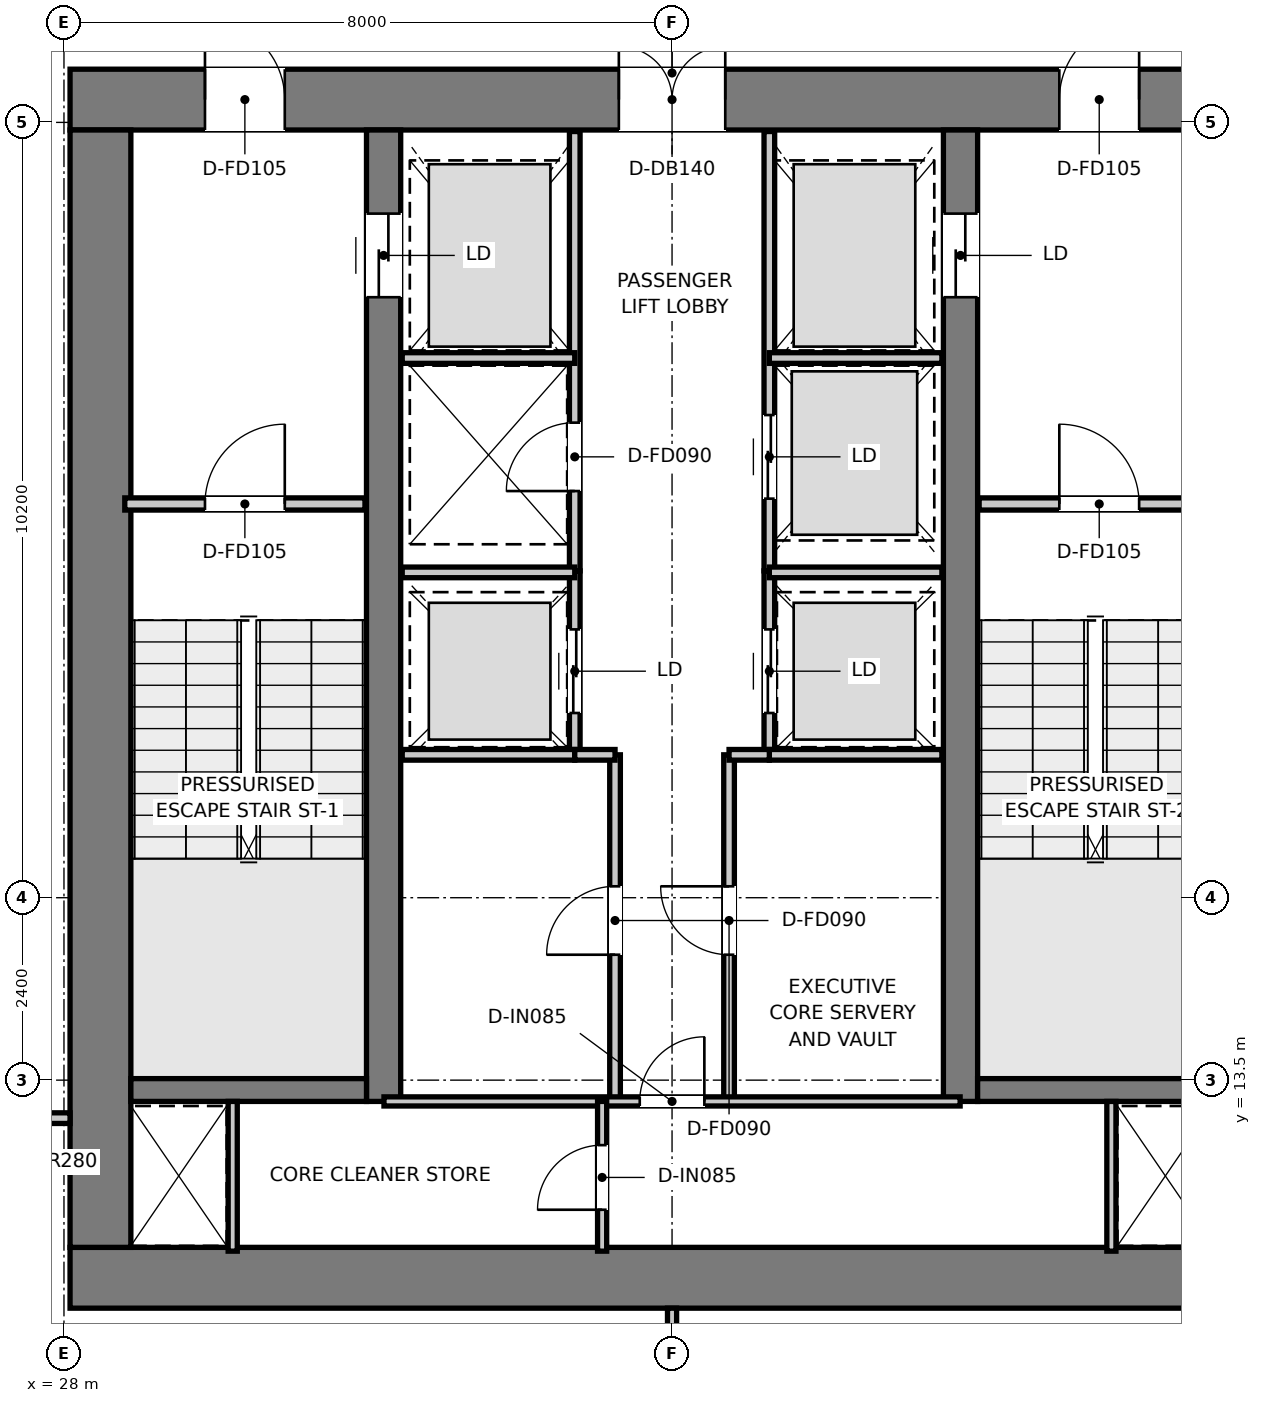
"""IFC4 building model, lengths in metres.
Left out: names, types, materials, properties, quantities, classifications, styles, units other than length and angle.
Written with IfcOpenShell. Run it as: python <this file> out.ifc"""

import sys

from ifc_helpers import new_model, si_unit, direction, frame, frame_2d, origin, place, context, subcontext, project, spatial, rectangle, extrude, element, fill, save


model = new_model("IFC4")
c1 = context("Model", 3, precision=1e-05, world=origin(), true_north=direction((0.0, 1.0)))
c2 = subcontext(c1, "Body", "Model", "MODEL_VIEW")
j1 = project(units=[si_unit("LENGTHUNIT", "METRE"), si_unit("PLANEANGLEUNIT", "RADIAN")], contexts=[c1])
p1 = place(None, origin())
s1 = spatial("IfcSite", under=j1, at=p1, CompositionType="ELEMENT")
p2 = place(p1, origin())
s2 = spatial("IfcBuilding", under=s1, at=p2, CompositionType="ELEMENT")
p3 = place(p2, frame((0.0, 0.0, 359.3)))
s3 = spatial("IfcBuildingStorey", under=s2, at=p3, CompositionType="ELEMENT", Elevation=359.3)
p4 = place(p3, frame((28.08, 10.9, 0.0), z_axis=(0.0, 0.0, 1.0), x_axis=(1.0, 0.0, 0.0)))
e1 = element("IfcWall", 1, at=p4, inside=s3, PredefinedType="SHEAR", context=c2, shape_type="SweptSolid", body=[
    extrude(rectangle(XDim=15.84, YDim=0.8, at=frame_2d((7.92, 0.0))), origin(), (0.0, 0.0, 1.0), 3.95),
])
p5 = place(p3, frame((28.08, 26.4, 0.0), z_axis=(0.0, 0.0, 1.0), x_axis=(1.0, 0.0, 0.0)))
e2 = element("IfcWall", 2, at=p5, inside=s3, PredefinedType="SHEAR", context=c2, shape_type="SweptSolid", body=[
    extrude(rectangle(XDim=15.84, YDim=0.8, at=frame_2d((7.92, 0.0))), origin(), (0.0, 0.0, 1.0), 3.95),
])
p6 = place(p5, frame((7.22, 0.0, 0.0)))
e3 = element("IfcOpeningElement", 3, at=p6, cuts=e2, PredefinedType="OPENING", context=c2, shape_type="SweptSolid", body=[
    extrude(rectangle(XDim=1.4, YDim=2.2, at=frame_2d((0.7, 1.1))), frame((0.0, 0.41, 0.0), z_axis=(0.0, -1.0, 0.0), x_axis=(1.0, 0.0, 0.0)), (0.0, 0.0, 1.0), 0.82),
])
p7 = place(p5, frame((1.775, 0.0, 0.0)))
e4 = element("IfcOpeningElement", 4, at=p7, cuts=e2, PredefinedType="OPENING", context=c2, shape_type="SweptSolid", body=[
    extrude(rectangle(XDim=1.05, YDim=2.1, at=frame_2d((0.525, 1.05))), frame((0.0, 0.41, 0.0), z_axis=(0.0, -1.0, 0.0), x_axis=(1.0, 0.0, 0.0)), (0.0, 0.0, 1.0), 0.82),
])
p8 = place(p5, frame((13.015, 0.0, 0.0)))
e5 = element("IfcOpeningElement", 5, at=p8, cuts=e2, PredefinedType="OPENING", context=c2, shape_type="SweptSolid", body=[
    extrude(rectangle(XDim=1.05, YDim=2.1, at=frame_2d((0.525, 1.05))), frame((0.0, 0.41, 0.0), z_axis=(0.0, -1.0, 0.0), x_axis=(1.0, 0.0, 0.0)), (0.0, 0.0, 1.0), 0.82),
])
p9 = place(p3, frame((28.48, 11.3, 0.0), z_axis=(0.0, 0.0, 1.0), x_axis=(0.0, 1.0, 0.0)))
e6 = element("IfcWall", 6, at=p9, inside=s3, PredefinedType="SHEAR", context=c2, shape_type="SweptSolid", body=[
    extrude(rectangle(XDim=14.7, YDim=0.8, at=frame_2d((7.35, 0.0))), origin(), (0.0, 0.0, 1.0), 3.95),
])
p10 = place(p3, frame((32.205, 13.22, 0.0), z_axis=(0.0, 0.0, 1.0), x_axis=(0.0, 1.0, 0.0)))
e7 = element("IfcWall", 7, at=p10, inside=s3, PredefinedType="SHEAR", context=c2, shape_type="SweptSolid", body=[
    extrude(rectangle(XDim=12.78, YDim=0.45, at=frame_2d((6.39, 0.0))), origin(), (0.0, 0.0, 1.0), 3.95),
])
p11 = place(p10, frame((10.58, 0.0, 0.0)))
e8 = element("IfcOpeningElement", 8, at=p11, cuts=e7, PredefinedType="OPENING", context=c2, shape_type="SweptSolid", body=[
    extrude(rectangle(XDim=1.1, YDim=2.15, at=frame_2d((0.55, 1.075))), frame((0.0, 0.235, 0.0), z_axis=(0.0, -1.0, 0.0), x_axis=(1.0, 0.0, 0.0)), (0.0, 0.0, 1.0), 0.47),
])
p12 = place(p3, frame((39.795, 13.22, 0.0), z_axis=(0.0, 0.0, 1.0), x_axis=(0.0, 1.0, 0.0)))
e9 = element("IfcWall", 9, at=p12, inside=s3, PredefinedType="SHEAR", context=c2, shape_type="SweptSolid", body=[
    extrude(rectangle(XDim=12.78, YDim=0.45, at=frame_2d((6.39, 0.0))), origin(), (0.0, 0.0, 1.0), 3.95),
])
p13 = place(p12, frame((10.58, 0.0, 0.0)))
e10 = element("IfcOpeningElement", 10, at=p13, cuts=e9, PredefinedType="OPENING", context=c2, shape_type="SweptSolid", body=[
    extrude(rectangle(XDim=1.1, YDim=2.15, at=frame_2d((0.55, 1.075))), frame((0.0, 0.235, 0.0), z_axis=(0.0, -1.0, 0.0), x_axis=(1.0, 0.0, 0.0)), (0.0, 0.0, 1.0), 0.47),
])
for number, where, z_axis, x_axis in (
    (11, (28.88, 13.37, 0.0), (0.0, 0.0, 1.0), (1.0, 0.0, 0.0)),
    (12, (40.02, 13.37, 0.0), (0.0, 0.0, 1.0), (1.0, 0.0, 0.0)),
):
    element("IfcWall", number, at=place(p3, frame(where, z_axis=z_axis, x_axis=x_axis)), inside=s3, PredefinedType="SHEAR", context=c2, shape_type="SweptSolid", body=[
        extrude(rectangle(XDim=3.1, YDim=0.3, at=frame_2d((1.55, 0.0))), origin(), (0.0, 0.0, 1.0), 3.95),
    ])
p14 = place(p3, frame((28.8, 21.08, 0.0), z_axis=(0.0, 0.0, 1.0), x_axis=(1.0, 0.0, 0.0)))
e13 = element("IfcWall", 13, at=p14, inside=s3, PredefinedType="PARTITIONING", context=c2, shape_type="SweptSolid", body=[
    extrude(rectangle(XDim=3.16, YDim=0.16, at=frame_2d((1.58, 0.0))), origin(), (0.0, 0.0, 1.0), 3.6),
])
p15 = place(p14, frame((1.055, 0.0, 0.0)))
e14 = element("IfcOpeningElement", 14, at=p15, cuts=e13, PredefinedType="OPENING", context=c2, shape_type="SweptSolid", body=[
    extrude(rectangle(XDim=1.05, YDim=2.1, at=frame_2d((0.525, 1.05))), frame((0.0, 0.09, 0.0), z_axis=(0.0, -1.0, 0.0), x_axis=(1.0, 0.0, 0.0)), (0.0, 0.0, 1.0), 0.18),
])
p16 = place(p3, frame((40.04, 21.08, 0.0), z_axis=(0.0, 0.0, 1.0), x_axis=(1.0, 0.0, 0.0)))
e15 = element("IfcWall", 15, at=p16, inside=s3, PredefinedType="PARTITIONING", context=c2, shape_type="SweptSolid", body=[
    extrude(rectangle(XDim=3.16, YDim=0.16, at=frame_2d((1.58, 0.0))), origin(), (0.0, 0.0, 1.0), 3.6),
])
p17 = place(p16, frame((1.055, 0.0, 0.0)))
e16 = element("IfcOpeningElement", 16, at=p17, cuts=e15, PredefinedType="OPENING", context=c2, shape_type="SweptSolid", body=[
    extrude(rectangle(XDim=1.05, YDim=2.1, at=frame_2d((0.525, 1.05))), frame((0.0, 0.09, 0.0), z_axis=(0.0, -1.0, 0.0), x_axis=(1.0, 0.0, 0.0)), (0.0, 0.0, 1.0), 0.18),
])
p18 = place(p3, frame((34.72, 20.2, 0.0), z_axis=(0.0, 0.0, 1.0), x_axis=(0.0, 1.0, 0.0)))
e17 = element("IfcWall", 17, at=p18, inside=s3, PredefinedType="PARTITIONING", context=c2, shape_type="SweptSolid", body=[
    extrude(rectangle(XDim=5.78, YDim=0.14, at=frame_2d((2.89, 0.0))), origin(), (0.0, 0.0, 1.0), 2.75),
])
p19 = place(p18, frame((1.05, 0.0, 0.0)))
e18 = element("IfcOpeningElement", 18, at=p19, cuts=e17, PredefinedType="OPENING", context=c2, shape_type="SweptSolid", body=[
    extrude(rectangle(XDim=0.9, YDim=2.1, at=frame_2d((0.45, 1.05))), frame((0.0, 0.08, 0.0), z_axis=(0.0, -1.0, 0.0), x_axis=(1.0, 0.0, 0.0)), (0.0, 0.0, 1.0), 0.16),
])
p20 = place(p3, frame((37.28, 20.2, 0.0), z_axis=(0.0, 0.0, 1.0), x_axis=(0.0, 1.0, 0.0)))
e19 = element("IfcWall", 19, at=p20, inside=s3, PredefinedType="PARTITIONING", context=c2, shape_type="SweptSolid", body=[
    extrude(rectangle(XDim=5.78, YDim=0.14, at=frame_2d((2.89, 0.0))), origin(), (0.0, 0.0, 1.0), 2.75),
])
p21 = place(p20, frame((0.95, 0.0, 0.0)))
e20 = element("IfcOpeningElement", 20, at=p21, cuts=e19, PredefinedType="OPENING", context=c2, shape_type="SweptSolid", body=[
    extrude(rectangle(XDim=1.1, YDim=2.15, at=frame_2d((0.55, 1.075))), frame((0.0, 0.08, 0.0), z_axis=(0.0, -1.0, 0.0), x_axis=(1.0, 0.0, 0.0)), (0.0, 0.0, 1.0), 0.16),
])
for number, where, z_axis, x_axis in (
    (21, (32.45, 23.0, 0.0), (0.0, 0.0, 1.0), (1.0, 0.0, 0.0)),
    (22, (37.28, 23.0, 0.0), (0.0, 0.0, 1.0), (1.0, 0.0, 0.0)),
):
    element("IfcWall", number, at=place(p3, frame(where, z_axis=z_axis, x_axis=x_axis)), inside=s3, PredefinedType="PARTITIONING", context=c2, shape_type="SweptSolid", body=[
        extrude(rectangle(XDim=2.27, YDim=0.14, at=frame_2d((1.135, 0.0))), origin(), (0.0, 0.0, 1.0), 2.75),
    ])
p22 = place(p3, frame((34.72, 17.78, 0.0), z_axis=(0.0, 0.0, 1.0), x_axis=(0.0, 1.0, 0.0)))
e23 = element("IfcWall", 23, at=p22, inside=s3, PredefinedType="PARTITIONING", context=c2, shape_type="SweptSolid", body=[
    extrude(rectangle(XDim=2.42, YDim=0.14, at=frame_2d((1.21, 0.0))), origin(), (0.0, 0.0, 1.0), 3.6),
])
p23 = place(p22, frame((0.55, 0.0, 0.0)))
e24 = element("IfcOpeningElement", 24, at=p23, cuts=e23, PredefinedType="OPENING", context=c2, shape_type="SweptSolid", body=[
    extrude(rectangle(XDim=1.1, YDim=2.15, at=frame_2d((0.55, 1.075))), frame((0.0, 0.08, 0.0), z_axis=(0.0, -1.0, 0.0), x_axis=(1.0, 0.0, 0.0)), (0.0, 0.0, 1.0), 0.16),
])
p24 = place(p3, frame((37.28, 17.78, 0.0), z_axis=(0.0, 0.0, 1.0), x_axis=(0.0, 1.0, 0.0)))
e25 = element("IfcWall", 25, at=p24, inside=s3, PredefinedType="PARTITIONING", context=c2, shape_type="SweptSolid", body=[
    extrude(rectangle(XDim=2.42, YDim=0.14, at=frame_2d((1.21, 0.0))), origin(), (0.0, 0.0, 1.0), 3.6),
])
p25 = place(p24, frame((0.55, 0.0, 0.0)))
e26 = element("IfcOpeningElement", 26, at=p25, cuts=e25, PredefinedType="OPENING", context=c2, shape_type="SweptSolid", body=[
    extrude(rectangle(XDim=1.1, YDim=2.15, at=frame_2d((0.55, 1.075))), frame((0.0, 0.08, 0.0), z_axis=(0.0, -1.0, 0.0), x_axis=(1.0, 0.0, 0.0)), (0.0, 0.0, 1.0), 0.16),
])
for number, where, z_axis, x_axis in (
    (27, (32.45, 17.78, 0.0), (0.0, 0.0, 1.0), (1.0, 0.0, 0.0)),
    (28, (32.45, 20.18, 0.0), (0.0, 0.0, 1.0), (1.0, 0.0, 0.0)),
    (29, (37.28, 17.78, 0.0), (0.0, 0.0, 1.0), (1.0, 0.0, 0.0)),
    (30, (37.28, 20.18, 0.0), (0.0, 0.0, 1.0), (1.0, 0.0, 0.0)),
):
    element("IfcWall", number, at=place(p3, frame(where, z_axis=z_axis, x_axis=x_axis)), inside=s3, PredefinedType="PARTITIONING", context=c2, shape_type="SweptSolid", body=[
        extrude(rectangle(XDim=2.27, YDim=0.14, at=frame_2d((1.135, 0.0))), origin(), (0.0, 0.0, 1.0), 3.6),
    ])
p26 = place(p3, frame((35.25, 13.22, 0.0), z_axis=(0.0, 0.0, 1.0), x_axis=(0.0, 1.0, 0.0)))
e31 = element("IfcWall", 31, at=p26, inside=s3, PredefinedType="PARTITIONING", context=c2, shape_type="SweptSolid", body=[
    extrude(rectangle(XDim=4.56, YDim=0.14, at=frame_2d((2.28, 0.0))), origin(), (0.0, 0.0, 1.0), 3.6),
])
p27 = place(p26, frame((1.93, 0.0, 0.0)))
e32 = element("IfcOpeningElement", 32, at=p27, cuts=e31, PredefinedType="OPENING", context=c2, shape_type="SweptSolid", body=[
    extrude(rectangle(XDim=0.9, YDim=2.1, at=frame_2d((0.45, 1.05))), frame((0.0, 0.08, 0.0), z_axis=(0.0, -1.0, 0.0), x_axis=(1.0, 0.0, 0.0)), (0.0, 0.0, 1.0), 0.16),
])
p28 = place(p3, frame((34.72, 17.78, 0.0), z_axis=(0.0, 0.0, 1.0), x_axis=(1.0, 0.0, 0.0)))
e33 = element("IfcWall", 33, at=p28, inside=s3, PredefinedType="PARTITIONING", context=c2, shape_type="SweptSolid", body=[
    extrude(rectangle(XDim=0.53, YDim=0.14, at=frame_2d((0.265, 0.0))), origin(), (0.0, 0.0, 1.0), 3.6),
])
p29 = place(p3, frame((36.75, 13.22, 0.0), z_axis=(0.0, 0.0, 1.0), x_axis=(0.0, 1.0, 0.0)))
e34 = element("IfcWall", 34, at=p29, inside=s3, PredefinedType="PARTITIONING", context=c2, shape_type="SweptSolid", body=[
    extrude(rectangle(XDim=4.56, YDim=0.14, at=frame_2d((2.28, 0.0))), origin(), (0.0, 0.0, 1.0), 3.6),
])
p30 = place(p29, frame((1.93, 0.0, 0.0)))
e35 = element("IfcOpeningElement", 35, at=p30, cuts=e34, PredefinedType="OPENING", context=c2, shape_type="SweptSolid", body=[
    extrude(rectangle(XDim=0.9, YDim=2.1, at=frame_2d((0.45, 1.05))), frame((0.0, 0.08, 0.0), z_axis=(0.0, -1.0, 0.0), x_axis=(1.0, 0.0, 0.0)), (0.0, 0.0, 1.0), 0.16),
])
p31 = place(p3, frame((36.75, 17.78, 0.0), z_axis=(0.0, 0.0, 1.0), x_axis=(1.0, 0.0, 0.0)))
e36 = element("IfcWall", 36, at=p31, inside=s3, PredefinedType="PARTITIONING", context=c2, shape_type="SweptSolid", body=[
    extrude(rectangle(XDim=0.53, YDim=0.14, at=frame_2d((0.265, 0.0))), origin(), (0.0, 0.0, 1.0), 3.6),
])
for number, where, z_axis, x_axis in (
    (37, (30.22, 11.25, 0.0), (0.0, 0.0, 1.0), (0.0, 1.0, 0.0)),
    (38, (41.78, 11.25, 0.0), (0.0, 0.0, 1.0), (0.0, 1.0, 0.0)),
):
    element("IfcWall", number, at=place(p3, frame(where, z_axis=z_axis, x_axis=x_axis)), inside=s3, PredefinedType="PARTITIONING", context=c2, shape_type="SweptSolid", body=[
        extrude(rectangle(XDim=1.97, YDim=0.12, at=frame_2d((0.985, 0.0))), origin(), (0.0, 0.0, 1.0), 3.6),
    ])
p32 = place(p3, frame((32.21, 13.22, 0.0), z_axis=(0.0, 0.0, 1.0), x_axis=(1.0, 0.0, 0.0)))
e39 = element("IfcWall", 39, at=p32, inside=s3, PredefinedType="PARTITIONING", context=c2, shape_type="SweptSolid", body=[
    extrude(rectangle(XDim=7.58, YDim=0.12, at=frame_2d((3.79, 0.0))), origin(), (0.0, 0.0, 1.0), 3.6),
])
p33 = place(p32, frame((3.365, 0.0, 0.0)))
e40 = element("IfcOpeningElement", 40, at=p33, cuts=e39, PredefinedType="OPENING", context=c2, shape_type="SweptSolid", body=[
    extrude(rectangle(XDim=0.85, YDim=2.1, at=frame_2d((0.425, 1.05))), frame((0.0, 0.07, 0.0), z_axis=(0.0, -1.0, 0.0), x_axis=(1.0, 0.0, 0.0)), (0.0, 0.0, 1.0), 0.14),
])
p34 = place(p3, frame((35.08, 11.25, 0.0), z_axis=(0.0, 0.0, 1.0), x_axis=(0.0, 1.0, 0.0)))
e41 = element("IfcWall", 41, at=p34, inside=s3, PredefinedType="PARTITIONING", context=c2, shape_type="SweptSolid", body=[
    extrude(rectangle(XDim=1.97, YDim=0.12, at=frame_2d((0.985, 0.0))), origin(), (0.0, 0.0, 1.0), 3.6),
])
p35 = place(p34, frame((0.545, 0.0, 0.0)))
e42 = element("IfcOpeningElement", 42, at=p35, cuts=e41, PredefinedType="OPENING", context=c2, shape_type="SweptSolid", body=[
    extrude(rectangle(XDim=0.85, YDim=2.1, at=frame_2d((0.425, 1.05))), frame((0.0, 0.07, 0.0), z_axis=(0.0, -1.0, 0.0), x_axis=(1.0, 0.0, 0.0)), (0.0, 0.0, 1.0), 0.14),
])
p36 = place(p3, frame((19.842, 13.0, 0.0), z_axis=(0.0, 0.0, 1.0), x_axis=(1.0, 0.0, 0.0)))
e43 = element("IfcWall", 43, at=p36, inside=s3, PredefinedType="PARTITIONING", context=c2, shape_type="SweptSolid", body=[
    extrude(rectangle(XDim=8.238, YDim=0.14, at=frame_2d((4.119, 0.0))), origin(), (0.0, 0.0, 1.0), 3.11),
])
p37 = place(p36, frame((6.933, 0.0, 0.0)))
e44 = element("IfcOpeningElement", 44, at=p37, cuts=e43, PredefinedType="OPENING", context=c2, shape_type="SweptSolid", body=[
    extrude(rectangle(XDim=0.85, YDim=2.1, at=frame_2d((0.425, 1.05))), frame((0.0, 0.08, 0.0), z_axis=(0.0, -1.0, 0.0), x_axis=(1.0, 0.0, 0.0)), (0.0, 0.0, 1.0), 0.16),
])
p38 = place(p3, frame((36.0, 7.253, 0.0), z_axis=(0.0, 0.0, 1.0), x_axis=(0.0, 1.0, 0.0)))
e45 = element("IfcWall", 45, at=p38, inside=s3, PredefinedType="PARTITIONING", context=c2, shape_type="SweptSolid", body=[
    extrude(rectangle(XDim=3.247, YDim=0.12, at=frame_2d((1.624, 0.0))), origin(), (0.0, 0.0, 1.0), 3.6),
])
p39 = place(p15, origin())
e46 = element("IfcDoor", 46, at=p39, inside=s3, OperationType="SINGLE_SWING_RIGHT", PredefinedType="DOOR", context=c2, shape_type="SweptSolid", body=[
    extrude(rectangle(XDim=1.05, YDim=2.1, at=frame_2d((0.525, 1.05))), frame((0.0, 0.025, 0.0), z_axis=(0.0, -1.0, 0.0), x_axis=(1.0, 0.0, 0.0)), (0.0, 0.0, 1.0), 0.05),
])
fill(e14, e46)
p40 = place(p17, origin())
e47 = element("IfcDoor", 47, at=p40, inside=s3, OperationType="SINGLE_SWING_LEFT", PredefinedType="DOOR", context=c2, shape_type="SweptSolid", body=[
    extrude(rectangle(XDim=1.05, YDim=2.1, at=frame_2d((0.525, 1.05))), frame((0.0, 0.025, 0.0), z_axis=(0.0, -1.0, 0.0), x_axis=(1.0, 0.0, 0.0)), (0.0, 0.0, 1.0), 0.05),
])
fill(e16, e47)
p41 = place(p6, origin())
e48 = element("IfcDoor", 48, at=p41, inside=s3, OperationType="DOUBLE_DOOR_SINGLE_SWING", PredefinedType="DOOR", context=c2, shape_type="SweptSolid", body=[
    extrude(rectangle(XDim=1.4, YDim=2.2, at=frame_2d((0.7, 1.1))), frame((0.0, 0.025, 0.0), z_axis=(0.0, -1.0, 0.0), x_axis=(1.0, 0.0, 0.0)), (0.0, 0.0, 1.0), 0.05),
])
fill(e3, e48)
p42 = place(p7, origin())
e49 = element("IfcDoor", 49, at=p42, inside=s3, OperationType="SINGLE_SWING_LEFT", PredefinedType="DOOR", context=c2, shape_type="SweptSolid", body=[
    extrude(rectangle(XDim=1.05, YDim=2.1, at=frame_2d((0.525, 1.05))), frame((0.0, 0.025, 0.0), z_axis=(0.0, -1.0, 0.0), x_axis=(1.0, 0.0, 0.0)), (0.0, 0.0, 1.0), 0.05),
])
fill(e4, e49)
p43 = place(p8, origin())
e50 = element("IfcDoor", 50, at=p43, inside=s3, OperationType="SINGLE_SWING_RIGHT", PredefinedType="DOOR", context=c2, shape_type="SweptSolid", body=[
    extrude(rectangle(XDim=1.05, YDim=2.1, at=frame_2d((0.525, 1.05))), frame((0.0, 0.025, 0.0), z_axis=(0.0, -1.0, 0.0), x_axis=(1.0, 0.0, 0.0)), (0.0, 0.0, 1.0), 0.05),
])
fill(e5, e50)
p44 = place(p11, origin())
e51 = element("IfcDoor", 51, at=p44, inside=s3, OperationType="DOUBLE_DOOR_SLIDING", PredefinedType="DOOR", context=c2, shape_type="SweptSolid", body=[
    extrude(rectangle(XDim=1.1, YDim=2.15, at=frame_2d((0.55, 1.075))), frame((0.0, 0.025, 0.0), z_axis=(0.0, -1.0, 0.0), x_axis=(1.0, 0.0, 0.0)), (0.0, 0.0, 1.0), 0.05),
])
fill(e8, e51)
p45 = place(p13, origin())
e52 = element("IfcDoor", 52, at=p45, inside=s3, OperationType="DOUBLE_DOOR_SLIDING", PredefinedType="DOOR", context=c2, shape_type="SweptSolid", body=[
    extrude(rectangle(XDim=1.1, YDim=2.15, at=frame_2d((0.55, 1.075))), frame((0.0, 0.025, 0.0), z_axis=(0.0, -1.0, 0.0), x_axis=(1.0, 0.0, 0.0)), (0.0, 0.0, 1.0), 0.05),
])
fill(e10, e52)
p46 = place(p19, origin())
e53 = element("IfcDoor", 53, at=p46, inside=s3, OperationType="SINGLE_SWING_LEFT", PredefinedType="DOOR", context=c2, shape_type="SweptSolid", body=[
    extrude(rectangle(XDim=0.9, YDim=2.1, at=frame_2d((0.45, 1.05))), frame((0.0, 0.025, 0.0), z_axis=(0.0, -1.0, 0.0), x_axis=(1.0, 0.0, 0.0)), (0.0, 0.0, 1.0), 0.05),
])
fill(e18, e53)
p47 = place(p21, origin())
e54 = element("IfcDoor", 54, at=p47, inside=s3, OperationType="DOUBLE_DOOR_SLIDING", PredefinedType="DOOR", context=c2, shape_type="SweptSolid", body=[
    extrude(rectangle(XDim=1.1, YDim=2.15, at=frame_2d((0.55, 1.075))), frame((0.0, 0.025, 0.0), z_axis=(0.0, -1.0, 0.0), x_axis=(1.0, 0.0, 0.0)), (0.0, 0.0, 1.0), 0.05),
])
fill(e20, e54)
p48 = place(p23, origin())
e55 = element("IfcDoor", 55, at=p48, inside=s3, OperationType="DOUBLE_DOOR_SLIDING", PredefinedType="DOOR", context=c2, shape_type="SweptSolid", body=[
    extrude(rectangle(XDim=1.1, YDim=2.15, at=frame_2d((0.55, 1.075))), frame((0.0, 0.025, 0.0), z_axis=(0.0, -1.0, 0.0), x_axis=(1.0, 0.0, 0.0)), (0.0, 0.0, 1.0), 0.05),
])
fill(e24, e55)
p49 = place(p25, origin())
e56 = element("IfcDoor", 56, at=p49, inside=s3, OperationType="DOUBLE_DOOR_SLIDING", PredefinedType="DOOR", context=c2, shape_type="SweptSolid", body=[
    extrude(rectangle(XDim=1.1, YDim=2.15, at=frame_2d((0.55, 1.075))), frame((0.0, 0.025, 0.0), z_axis=(0.0, -1.0, 0.0), x_axis=(1.0, 0.0, 0.0)), (0.0, 0.0, 1.0), 0.05),
])
fill(e26, e56)
p50 = place(p27, origin())
e57 = element("IfcDoor", 57, at=p50, inside=s3, OperationType="SINGLE_SWING_LEFT", PredefinedType="DOOR", context=c2, shape_type="SweptSolid", body=[
    extrude(rectangle(XDim=0.9, YDim=2.1, at=frame_2d((0.45, 1.05))), frame((0.0, 0.025, 0.0), z_axis=(0.0, -1.0, 0.0), x_axis=(1.0, 0.0, 0.0)), (0.0, 0.0, 1.0), 0.05),
])
fill(e32, e57)
p51 = place(p30, origin())
e58 = element("IfcDoor", 58, at=p51, inside=s3, OperationType="SINGLE_SWING_RIGHT", PredefinedType="DOOR", context=c2, shape_type="SweptSolid", body=[
    extrude(rectangle(XDim=0.9, YDim=2.1, at=frame_2d((0.45, 1.05))), frame((0.0, 0.025, 0.0), z_axis=(0.0, -1.0, 0.0), x_axis=(1.0, 0.0, 0.0)), (0.0, 0.0, 1.0), 0.05),
])
fill(e35, e58)
p52 = place(p33, origin())
e59 = element("IfcDoor", 59, at=p52, inside=s3, OperationType="SINGLE_SWING_RIGHT", PredefinedType="DOOR", context=c2, shape_type="SweptSolid", body=[
    extrude(rectangle(XDim=0.85, YDim=2.1, at=frame_2d((0.425, 1.05))), frame((0.0, 0.025, 0.0), z_axis=(0.0, -1.0, 0.0), x_axis=(1.0, 0.0, 0.0)), (0.0, 0.0, 1.0), 0.05),
])
fill(e40, e59)
p53 = place(p35, origin())
e60 = element("IfcDoor", 60, at=p53, inside=s3, OperationType="SINGLE_SWING_LEFT", PredefinedType="DOOR", context=c2, shape_type="SweptSolid", body=[
    extrude(rectangle(XDim=0.85, YDim=2.1, at=frame_2d((0.425, 1.05))), frame((0.0, 0.025, 0.0), z_axis=(0.0, -1.0, 0.0), x_axis=(1.0, 0.0, 0.0)), (0.0, 0.0, 1.0), 0.05),
])
fill(e42, e60)
save(model, sys.argv[1])
